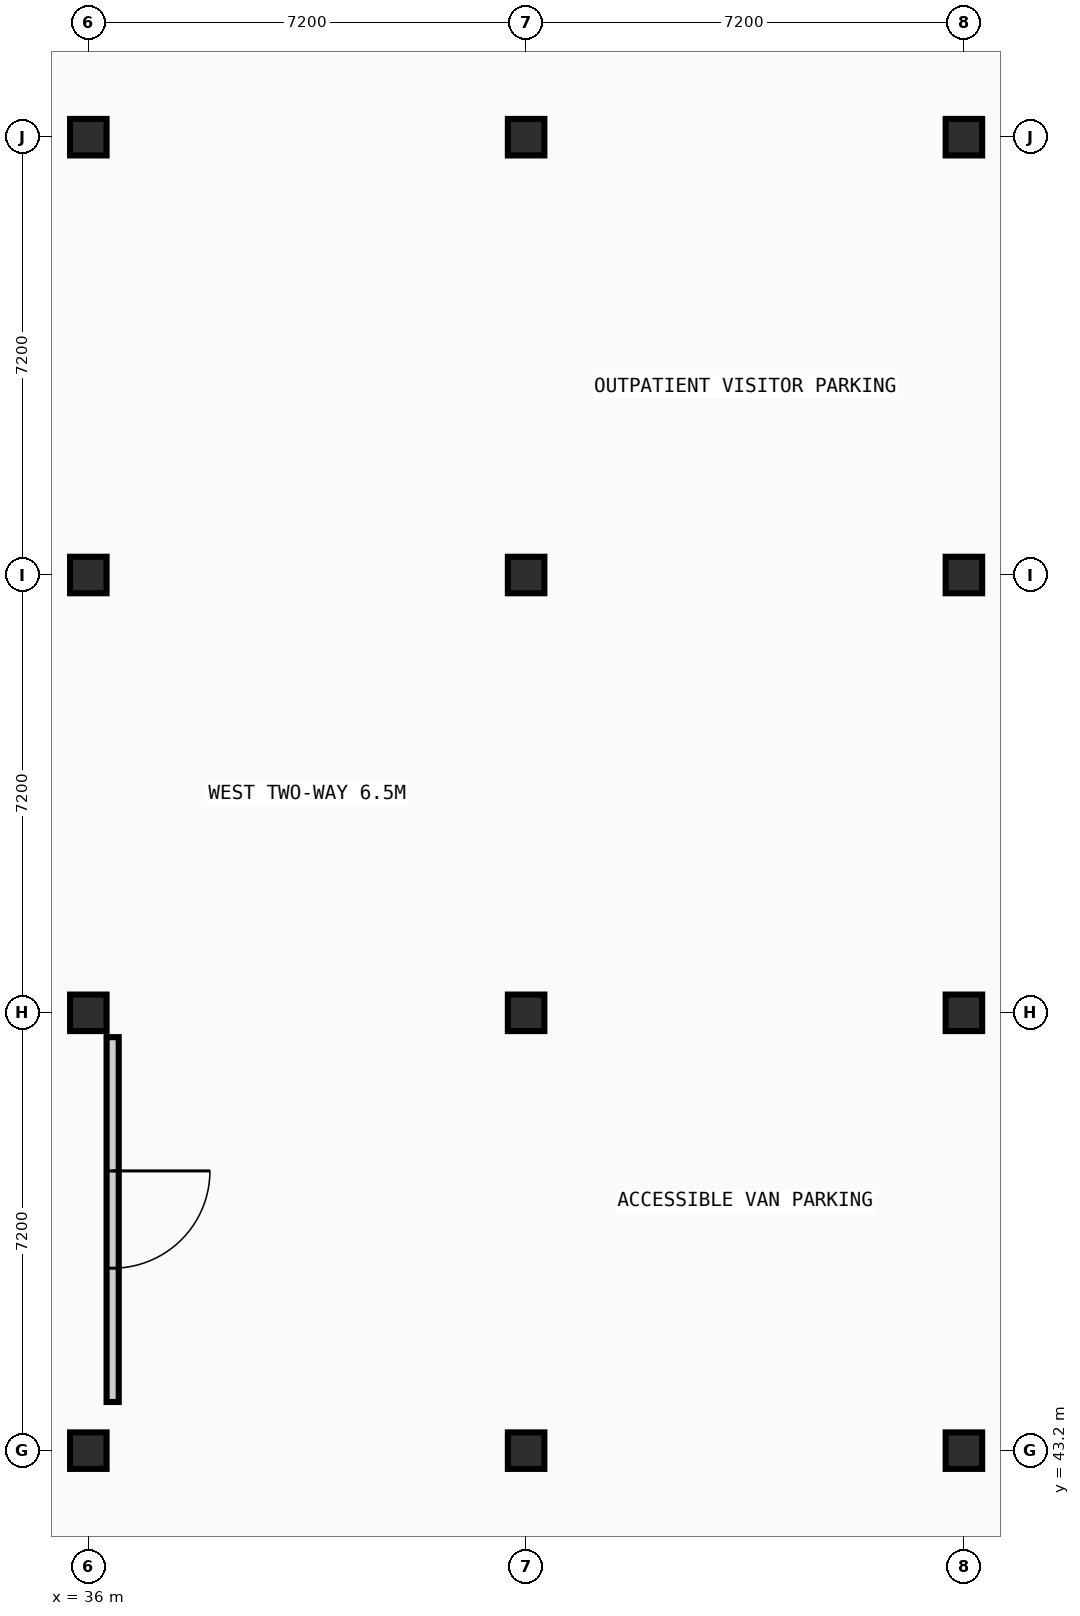
"""IFC4 building model, lengths in metres.
Left out: names, types, materials, properties, quantities, classifications, styles, units other than length and angle.
Written with IfcOpenShell. Run it as: python <this file> out.ifc"""

import sys

from ifc_helpers import new_model, si_unit, direction, frame, frame_2d, origin, origin_2d, place, context, subcontext, project, spatial, rectangle, extrude, element, fill, save


model = new_model("IFC4")
c1 = context("Model", 3, precision=1e-05, world=origin(), true_north=direction((0.0, 1.0)))
c2 = subcontext(c1, "Body", "Model", "MODEL_VIEW")
j1 = project(units=[si_unit("LENGTHUNIT", "METRE"), si_unit("PLANEANGLEUNIT", "RADIAN")], contexts=[c1])
p1 = place(None, origin())
s1 = spatial("IfcSite", under=j1, at=p1, CompositionType="ELEMENT")
p2 = place(p1, origin())
s2 = spatial("IfcBuilding", under=s1, at=p2, CompositionType="ELEMENT")
p3 = place(p2, frame((0.0, 0.0, -4.8)))
s3 = spatial("IfcBuildingStorey", under=s2, at=p3, CompositionType="ELEMENT", Elevation=-4.8)
for number, where, z_axis, x_axis in (
    (1, (36.0, 43.2, 0.0), (0.0, 0.0, 1.0), (1.0, 0.0, 0.0)),
    (2, (36.0, 50.4, 0.0), (0.0, 0.0, 1.0), (1.0, 0.0, 0.0)),
    (3, (36.0, 57.6, 0.0), (0.0, 0.0, 1.0), (1.0, 0.0, 0.0)),
    (4, (36.0, 64.8, 0.0), (0.0, 0.0, 1.0), (1.0, 0.0, 0.0)),
    (5, (43.2, 43.2, 0.0), (0.0, 0.0, 1.0), (1.0, 0.0, 0.0)),
    (6, (43.2, 50.4, 0.0), (0.0, 0.0, 1.0), (1.0, 0.0, 0.0)),
    (7, (43.2, 57.6, 0.0), (0.0, 0.0, 1.0), (1.0, 0.0, 0.0)),
    (8, (43.2, 64.8, 0.0), (0.0, 0.0, 1.0), (1.0, 0.0, 0.0)),
    (9, (50.4, 43.2, 0.0), (0.0, 0.0, 1.0), (1.0, 0.0, 0.0)),
    (10, (50.4, 50.4, 0.0), (0.0, 0.0, 1.0), (1.0, 0.0, 0.0)),
    (11, (50.4, 57.6, 0.0), (0.0, 0.0, 1.0), (1.0, 0.0, 0.0)),
    (12, (50.4, 64.8, 0.0), (0.0, 0.0, 1.0), (1.0, 0.0, 0.0)),
):
    element("IfcColumn", number, at=place(p3, frame(where, z_axis=z_axis, x_axis=x_axis)), inside=s3, PredefinedType="COLUMN", context=c2, shape_type="SweptSolid", body=[
        extrude(rectangle(XDim=0.6, YDim=0.6, at=origin_2d()), origin(), (0.0, 0.0, 1.0), 4.8),
    ])
p4 = place(p3, frame((36.4, 44.0, 0.0), z_axis=(0.0, 0.0, 1.0), x_axis=(0.0, 1.0, 0.0)))
e13 = element("IfcWall", 13, at=p4, inside=s3, PredefinedType="PARTITIONING", context=c2, shape_type="SweptSolid", body=[
    extrude(rectangle(XDim=6.0, YDim=0.2, at=frame_2d((3.0, 0.0))), origin(), (0.0, 0.0, 1.0), 4.45),
])
p5 = place(p4, frame((2.2, 0.0, 0.0)))
e14 = element("IfcOpeningElement", 14, at=p5, cuts=e13, PredefinedType="OPENING", context=c2, shape_type="SweptSolid", body=[
    extrude(rectangle(XDim=1.6, YDim=2.2, at=frame_2d((0.8, 1.1))), frame((0.0, 0.11, 0.0), z_axis=(0.0, -1.0, 0.0), x_axis=(1.0, 0.0, 0.0)), (0.0, 0.0, 1.0), 0.22),
])
p6 = place(p5, origin())
e15 = element("IfcDoor", 15, at=p6, inside=s3, OperationType="DOUBLE_DOOR_SINGLE_SWING", PredefinedType="DOOR", context=c2, shape_type="SweptSolid", body=[
    extrude(rectangle(XDim=1.6, YDim=2.2, at=frame_2d((0.8, 1.1))), frame((0.0, 0.025, 0.0), z_axis=(0.0, -1.0, 0.0), x_axis=(1.0, 0.0, 0.0)), (0.0, 0.0, 1.0), 0.05),
])
fill(e14, e15)
save(model, sys.argv[1])
